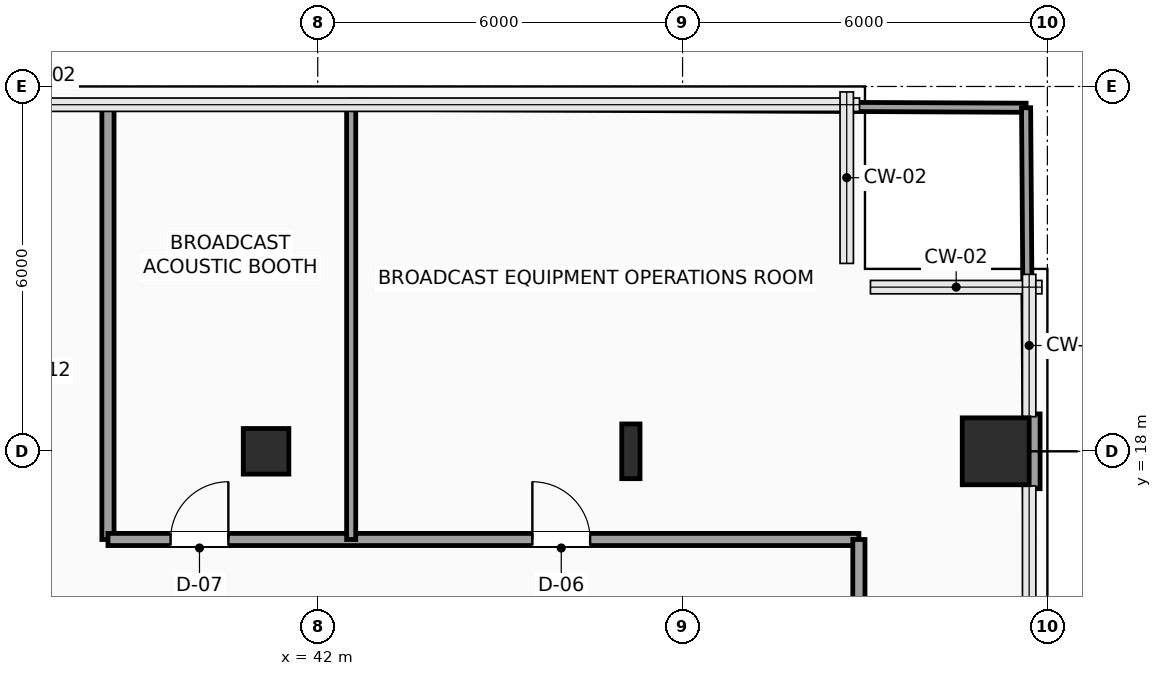
"""IFC4 building model, lengths in metres.
Left out: names, types, materials, properties, quantities, classifications, styles, units other than length and angle.
Written with IfcOpenShell. Run it as: python <this file> out.ifc"""

import sys

from ifc_helpers import new_model, si_unit, direction, frame, frame_2d, origin, origin_2d, place, context, subcontext, project, spatial, rectangle, hollow_rectangle, i_section, extrude, element, fill, save


model = new_model("IFC4")
c1 = context("Model", 3, precision=1e-05, world=origin(), true_north=direction((0.0, 1.0)))
c2 = subcontext(c1, "Body", "Model", "MODEL_VIEW")
j1 = project(units=[si_unit("LENGTHUNIT", "METRE"), si_unit("PLANEANGLEUNIT", "RADIAN")], contexts=[c1])
p1 = place(None, origin())
s1 = spatial("IfcSite", under=j1, at=p1, CompositionType="ELEMENT")
p2 = place(p1, origin())
s2 = spatial("IfcBuilding", under=s1, at=p2, CompositionType="ELEMENT")
p3 = place(p2, frame((0.0, 0.0, 63.6)))
s3 = spatial("IfcBuildingStorey", under=s2, at=p3, CompositionType="ELEMENT", Elevation=63.6)
p4 = place(p3, frame((41.15, 18.0, 0.0), z_axis=(0.0, 0.0, 1.0), x_axis=(1.0, 0.0, 0.0)))
e1 = element("IfcColumn", 1, at=p4, inside=s3, PredefinedType="COLUMN", context=c2, shape_type="SweptSolid", body=[
    extrude(hollow_rectangle(XDim=0.75, YDim=0.75, WallThickness=0.035, InnerFilletRadius=0.035, OuterFilletRadius=0.05, at=origin_2d()), origin(), (0.0, 0.0, 1.0), 3.9),
])
p5 = place(p3, frame((47.15, 18.0, 0.0), z_axis=(0.0, 0.0, 1.0), x_axis=(1.0, 0.0, 0.0)))
e2 = element("IfcColumn", 2, at=p5, inside=s3, PredefinedType="COLUMN", context=c2, shape_type="SweptSolid", body=[
    extrude(i_section(OverallWidth=0.3, OverallDepth=0.9, WebThickness=0.019, FlangeThickness=0.035, FilletRadius=0.03, at=origin_2d()), origin(), (0.0, 0.0, 1.0), 3.9),
])
p6 = place(p3, frame((53.15, 18.0, 0.0), z_axis=(0.0, 0.0, 1.0), x_axis=(1.0, 0.0, 0.0)))
e3 = element("IfcColumn", 3, at=p6, inside=s3, PredefinedType="COLUMN", context=c2, shape_type="SweptSolid", body=[
    extrude(rectangle(XDim=1.1, YDim=1.1, at=origin_2d()), origin(), (0.0, 0.0, 1.0), 3.9),
])
p7 = place(p3, frame((53.76, 18.615, 0.0), z_axis=(0.0, 0.0, 1.0), x_axis=(0.0, -1.0, 0.0)))
e4 = element("IfcWall", 4, at=p7, inside=s3, PredefinedType="SOLIDWALL", context=c2, shape_type="SweptSolid", body=[
    extrude(rectangle(XDim=1.23, YDim=0.24, at=frame_2d((0.615, 0.0))), origin(), (0.0, 0.0, 1.0), 3.65),
])
p8 = place(p3, frame((38.55, 23.7, 0.0), z_axis=(0.0, 0.0, 1.0), x_axis=(0.0, -1.0, 0.0)))
e5 = element("IfcWall", 5, at=p8, inside=s3, PredefinedType="SOLIDWALL", context=c2, shape_type="SweptSolid", body=[
    extrude(rectangle(XDim=7.15, YDim=0.2, at=frame_2d((3.575, 0.0))), origin(), (0.0, 0.0, 1.0), 3.65),
])
p9 = place(p3, frame((38.55, 16.55, 0.0), z_axis=(0.0, 0.0, 1.0), x_axis=(1.0, 0.0, 0.0)))
e6 = element("IfcWall", 6, at=p9, inside=s3, PredefinedType="SOLIDWALL", context=c2, shape_type="SweptSolid", body=[
    extrude(rectangle(XDim=12.35, YDim=0.2, at=frame_2d((6.175, 0.0))), origin(), (0.0, 0.0, 1.0), 3.65),
])
p10 = place(p9, frame((1.03, 0.0, 0.0)))
e7 = element("IfcOpeningElement", 7, at=p10, cuts=e6, PredefinedType="OPENING", context=c2, shape_type="SweptSolid", body=[
    extrude(rectangle(XDim=0.95, YDim=2.15, at=frame_2d((0.475, 1.075))), frame((0.0, 0.11, 0.0), z_axis=(0.0, -1.0, 0.0), x_axis=(1.0, 0.0, 0.0)), (0.0, 0.0, 1.0), 0.22),
])
p11 = place(p9, frame((6.98, 0.0, 0.0)))
e8 = element("IfcOpeningElement", 8, at=p11, cuts=e6, PredefinedType="OPENING", context=c2, shape_type="SweptSolid", body=[
    extrude(rectangle(XDim=0.95, YDim=2.15, at=frame_2d((0.475, 1.075))), frame((0.0, 0.11, 0.0), z_axis=(0.0, -1.0, 0.0), x_axis=(1.0, 0.0, 0.0)), (0.0, 0.0, 1.0), 0.22),
])
p12 = place(p3, frame((50.9, 16.55, 0.0), z_axis=(0.0, 0.0, 1.0), x_axis=(0.0, -1.0, 0.0)))
e9 = element("IfcWall", 9, at=p12, inside=s3, PredefinedType="SOLIDWALL", context=c2, shape_type="SweptSolid", body=[
    extrude(rectangle(XDim=2.35, YDim=0.2, at=frame_2d((1.175, 0.0))), origin(), (0.0, 0.0, 1.0), 3.65),
])
p13 = place(p3, frame((42.55, 16.55, 0.0), z_axis=(0.0, 0.0, 1.0), x_axis=(0.0, 1.0, 0.0)))
e10 = element("IfcWall", 10, at=p13, inside=s3, PredefinedType="PARTITIONING", context=c2, shape_type="SweptSolid", body=[
    extrude(rectangle(XDim=7.15, YDim=0.15, at=frame_2d((3.575, 0.0))), origin(), (0.0, 0.0, 1.0), 3.65),
])
p14 = place(p3, frame((42.55, 23.7, 0.0), z_axis=(0.0, 0.0, 1.0), x_axis=(0.999989834782, -0.004508917104, 0.0)))
e11 = element("IfcWall", 11, at=p14, inside=s3, PredefinedType="PARTITIONING", context=c2, shape_type="SweptSolid", body=[
    extrude(rectangle(XDim=11.1, YDim=0.15, at=frame_2d((5.55, 0.0))), origin(), (0.0, 0.0, 1.0), 3.65),
])
p15 = place(p3, frame((53.7, 16.55, 0.0), z_axis=(0.0, 0.0, 1.0), x_axis=(-0.007017371073, 0.999975377948, 0.0)))
e12 = element("IfcWall", 12, at=p15, inside=s3, PredefinedType="PARTITIONING", context=c2, shape_type="SweptSolid", body=[
    extrude(rectangle(XDim=0.835, YDim=0.15, at=frame_2d((0.417, 0.0))), origin(), (0.0, 0.0, 1.0), 3.65),
])
p16 = place(p3, frame((53.686, 18.615, 0.0), z_axis=(0.0, 0.0, 1.0), x_axis=(-0.007079296972, 0.999974941463, 0.0)))
e13 = element("IfcWall", 13, at=p16, inside=s3, PredefinedType="PARTITIONING", context=c2, shape_type="SweptSolid", body=[
    extrude(rectangle(XDim=5.035, YDim=0.15, at=frame_2d((2.518, 0.0))), origin(), (0.0, 0.0, 1.0), 3.65),
])
p17 = place(p10, origin())
e14 = element("IfcDoor", 14, at=p17, inside=s3, OperationType="SINGLE_SWING_RIGHT", PredefinedType="DOOR", context=c2, shape_type="SweptSolid", body=[
    extrude(rectangle(XDim=0.95, YDim=2.15, at=frame_2d((0.475, 1.075))), frame((0.0, 0.025, 0.0), z_axis=(0.0, -1.0, 0.0), x_axis=(1.0, 0.0, 0.0)), (0.0, 0.0, 1.0), 0.05),
])
fill(e7, e14)
p18 = place(p11, origin())
e15 = element("IfcDoor", 15, at=p18, inside=s3, OperationType="SINGLE_SWING_LEFT", PredefinedType="DOOR", context=c2, shape_type="SweptSolid", body=[
    extrude(rectangle(XDim=0.95, YDim=2.15, at=frame_2d((0.475, 1.075))), frame((0.0, 0.025, 0.0), z_axis=(0.0, -1.0, 0.0), x_axis=(1.0, 0.0, 0.0)), (0.0, 0.0, 1.0), 0.05),
])
fill(e8, e15)
save(model, sys.argv[1])
